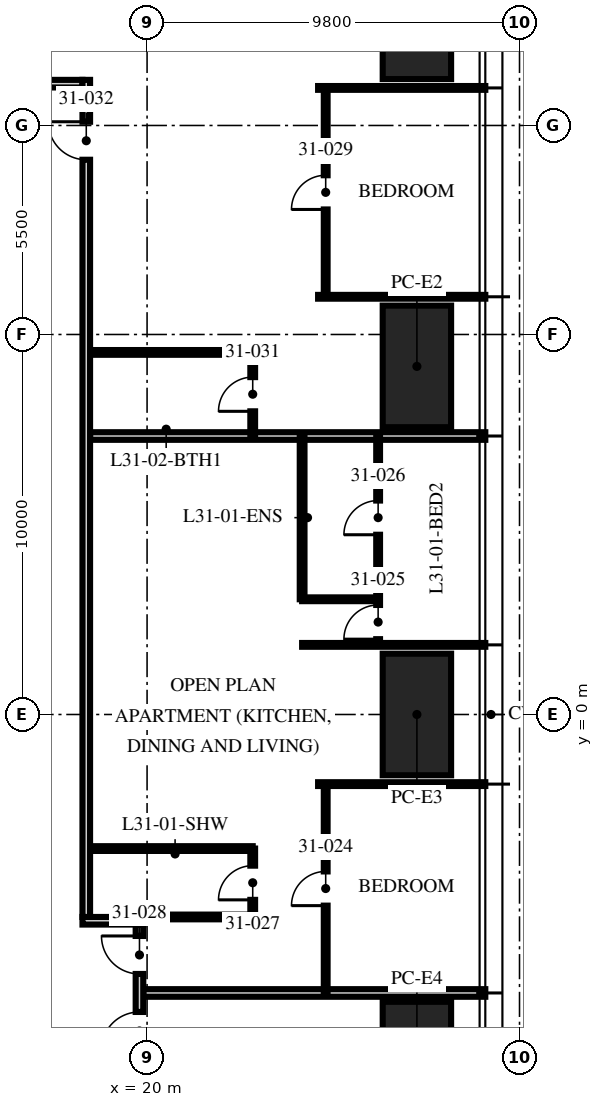
"""IFC4 building model, lengths in metres.
Left out: names, types, materials, properties, quantities, classifications, styles, units other than length and angle.
Written with IfcOpenShell. Run it as: python <this file> out.ifc"""

import sys

from ifc_helpers import new_model, si_unit, direction, frame, frame_2d, origin, origin_2d, place, context, subcontext, project, spatial, rectangle, extrude, element, fill, save


model = new_model("IFC4")
c1 = context("Model", 3, precision=1e-05, world=origin(), true_north=direction((0.0, 1.0)))
c2 = subcontext(c1, "Body", "Model", "MODEL_VIEW")
j1 = project(units=[si_unit("LENGTHUNIT", "METRE"), si_unit("PLANEANGLEUNIT", "RADIAN")], contexts=[c1])
p1 = place(None, origin())
s1 = spatial("IfcSite", under=j1, at=p1, CompositionType="ELEMENT")
p2 = place(p1, origin())
s2 = spatial("IfcBuilding", under=s1, at=p2, CompositionType="ELEMENT")
p3 = place(p2, frame((0.0, 0.0, 126.0)))
s3 = spatial("IfcBuildingStorey", under=s2, at=p3, CompositionType="ELEMENT", Elevation=126.0)
for number, where, z_axis, x_axis in (
    (1, (27.1, 18.32, 0.0), (0.0, 0.0, 1.0), (0.0, 1.0, 0.0)),
    (2, (27.1, 9.16, 0.0), (0.0, 0.0, 1.0), (0.0, 1.0, 0.0)),
    (3, (27.1, 0.0, 0.0), (0.0, 0.0, 1.0), (0.0, 1.0, 0.0)),
    (4, (27.1, -9.16, 0.0), (0.0, 0.0, 1.0), (0.0, 1.0, 0.0)),
):
    element("IfcColumn", number, at=place(p3, frame(where, z_axis=z_axis, x_axis=x_axis)), inside=s3, PredefinedType="COLUMN", context=c2, shape_type="SweptSolid", body=[
        extrude(rectangle(XDim=3.2, YDim=1.8, at=origin_2d()), origin(), (0.0, 0.0, 1.0), 3.75),
    ])
p4 = place(p3, frame((16.5, 16.6, 0.0), z_axis=(0.0, 0.0, 1.0), x_axis=(1.0, 0.0, 0.0)))
e5 = element("IfcWall", 5, at=p4, inside=s3, PredefinedType="PARTITIONING", context=c2, shape_type="SweptSolid", body=[
    extrude(rectangle(XDim=1.8, YDim=0.2, at=frame_2d((0.9, 0.0))), origin(), (0.0, 0.0, 1.0), 2.3),
])
p5 = place(p3, frame((19.9, -7.328, 0.0), z_axis=(0.0, 0.0, 1.0), x_axis=(1.0, 0.0, 0.0)))
e6 = element("IfcWall", 6, at=p5, inside=s3, PredefinedType="PARTITIONING", context=c2, shape_type="SweptSolid", body=[
    extrude(rectangle(XDim=9.0, YDim=0.2, at=frame_2d((4.5, 0.0))), origin(), (0.0, 0.0, 1.0), 2.81),
])
p6 = place(p3, frame((24.5, -1.832, 0.0), z_axis=(0.0, 0.0, 1.0), x_axis=(1.0, 0.0, 0.0)))
e7 = element("IfcWall", 7, at=p6, inside=s3, PredefinedType="PARTITIONING", context=c2, shape_type="SweptSolid", body=[
    extrude(rectangle(XDim=4.4, YDim=0.1, at=frame_2d((2.2, 0.0))), origin(), (0.0, 0.0, 1.0), 2.81),
])
p7 = place(p3, frame((24.08, 1.832, 0.0), z_axis=(0.0, 0.0, 1.0), x_axis=(1.0, 0.0, 0.0)))
e8 = element("IfcWall", 8, at=p7, inside=s3, PredefinedType="PARTITIONING", context=c2, shape_type="SweptSolid", body=[
    extrude(rectangle(XDim=4.82, YDim=0.1, at=frame_2d((2.41, 0.0))), origin(), (0.0, 0.0, 1.0), 2.81),
])
p8 = place(p3, frame((18.5, 7.328, 0.0), z_axis=(0.0, 0.0, 1.0), x_axis=(1.0, 0.0, 0.0)))
e9 = element("IfcWall", 9, at=p8, inside=s3, PredefinedType="PARTITIONING", context=c2, shape_type="SweptSolid", body=[
    extrude(rectangle(XDim=10.4, YDim=0.2, at=frame_2d((5.2, 0.0))), origin(), (0.0, 0.0, 1.0), 2.81),
])
for number, where, z_axis, x_axis in (
    (10, (24.5, 10.992, 0.0), (0.0, 0.0, 1.0), (1.0, 0.0, 0.0)),
    (11, (24.5, 16.488, 0.0), (0.0, 0.0, 1.0), (1.0, 0.0, 0.0)),
):
    element("IfcWall", number, at=place(p3, frame(where, z_axis=z_axis, x_axis=x_axis)), inside=s3, PredefinedType="PARTITIONING", context=c2, shape_type="SweptSolid", body=[
        extrude(rectangle(XDim=4.4, YDim=0.1, at=frame_2d((2.2, 0.0))), origin(), (0.0, 0.0, 1.0), 2.81),
    ])
p9 = place(p3, frame((24.7, -7.328, 0.0), z_axis=(0.0, 0.0, 1.0), x_axis=(0.0, 1.0, 0.0)))
e12 = element("IfcWall", 12, at=p9, inside=s3, PredefinedType="PARTITIONING", context=c2, shape_type="SweptSolid", body=[
    extrude(rectangle(XDim=5.496, YDim=0.1, at=frame_2d((2.748, 0.0))), origin(), (0.0, 0.0, 1.0), 2.81),
])
p10 = place(p9, frame((2.298, 0.0, 0.0)))
e13 = element("IfcOpeningElement", 13, at=p10, cuts=e12, PredefinedType="OPENING", context=c2, shape_type="SweptSolid", body=[
    extrude(rectangle(XDim=0.9, YDim=2.1, at=frame_2d((0.45, 1.05))), frame((0.0, 0.06, 0.0), z_axis=(0.0, -1.0, 0.0), x_axis=(1.0, 0.0, 0.0)), (0.0, 0.0, 1.0), 0.12),
])
p11 = place(p3, frame((26.08, 1.832, 0.0), z_axis=(0.0, 0.0, 1.0), x_axis=(0.0, 1.0, 0.0)))
e14 = element("IfcWall", 14, at=p11, inside=s3, PredefinedType="PARTITIONING", context=c2, shape_type="SweptSolid", body=[
    extrude(rectangle(XDim=5.496, YDim=0.1, at=frame_2d((2.748, 0.0))), origin(), (0.0, 0.0, 1.0), 2.81),
])
p12 = place(p11, frame((0.15, 0.0, 0.0)))
e15 = element("IfcOpeningElement", 15, at=p12, cuts=e14, PredefinedType="OPENING", context=c2, shape_type="SweptSolid", body=[
    extrude(rectangle(XDim=0.9, YDim=2.1, at=frame_2d((0.45, 1.05))), frame((0.0, 0.06, 0.0), z_axis=(0.0, -1.0, 0.0), x_axis=(1.0, 0.0, 0.0)), (0.0, 0.0, 1.0), 0.12),
])
p13 = place(p11, frame((2.898, 0.0, 0.0)))
e16 = element("IfcOpeningElement", 16, at=p13, cuts=e14, PredefinedType="OPENING", context=c2, shape_type="SweptSolid", body=[
    extrude(rectangle(XDim=0.9, YDim=2.1, at=frame_2d((0.45, 1.05))), frame((0.0, 0.06, 0.0), z_axis=(0.0, -1.0, 0.0), x_axis=(1.0, 0.0, 0.0)), (0.0, 0.0, 1.0), 0.12),
])
p14 = place(p3, frame((24.08, 3.032, 0.0), z_axis=(0.0, 0.0, 1.0), x_axis=(1.0, 0.0, 0.0)))
e17 = element("IfcWall", 17, at=p14, inside=s3, PredefinedType="PARTITIONING", context=c2, shape_type="SweptSolid", body=[
    extrude(rectangle(XDim=2.0, YDim=0.1, at=frame_2d((1.0, 0.0))), origin(), (0.0, 0.0, 1.0), 3.5),
])
p15 = place(p3, frame((24.08, 3.032, 0.0), z_axis=(0.0, 0.0, 1.0), x_axis=(0.0, 1.0, 0.0)))
e18 = element("IfcWall", 18, at=p15, inside=s3, PredefinedType="PARTITIONING", context=c2, shape_type="SweptSolid", body=[
    extrude(rectangle(XDim=4.296, YDim=0.125, at=frame_2d((2.148, 0.0))), origin(), (0.0, 0.0, 1.0), 2.81),
])
p16 = place(p3, frame((22.78, -5.328, 0.0), z_axis=(0.0, 0.0, 1.0), x_axis=(0.0, 1.0, 0.0)))
e19 = element("IfcWall", 19, at=p16, inside=s3, PredefinedType="PARTITIONING", context=c2, shape_type="SweptSolid", body=[
    extrude(rectangle(XDim=1.8, YDim=0.125, at=frame_2d((0.9, 0.0))), origin(), (0.0, 0.0, 1.0), 2.81),
])
p17 = place(p16, frame((0.45, 0.0, 0.0)))
e20 = element("IfcOpeningElement", 20, at=p17, cuts=e19, PredefinedType="OPENING", context=c2, shape_type="SweptSolid", body=[
    extrude(rectangle(XDim=0.9, YDim=2.1, at=frame_2d((0.45, 1.05))), frame((0.0, 0.073, 0.0), z_axis=(0.0, -1.0, 0.0), x_axis=(1.0, 0.0, 0.0)), (0.0, 0.0, 1.0), 0.145),
])
p18 = place(p3, frame((19.97, -5.328, 0.0), z_axis=(0.0, 0.0, 1.0), x_axis=(1.0, 0.0, 0.0)))
e21 = element("IfcWall", 21, at=p18, inside=s3, PredefinedType="PARTITIONING", context=c2, shape_type="SweptSolid", body=[
    extrude(rectangle(XDim=2.81, YDim=0.125, at=frame_2d((1.405, 0.0))), origin(), (0.0, 0.0, 1.0), 3.5),
])
p19 = place(p3, frame((18.5, -3.528, 0.0), z_axis=(0.0, 0.0, 1.0), x_axis=(1.0, 0.0, 0.0)))
e22 = element("IfcWall", 22, at=p19, inside=s3, PredefinedType="PARTITIONING", context=c2, shape_type="SweptSolid", body=[
    extrude(rectangle(XDim=4.28, YDim=0.125, at=frame_2d((2.14, 0.0))), origin(), (0.0, 0.0, 1.0), 3.5),
])
p20 = place(p3, frame((24.7, 10.992, 0.0), z_axis=(0.0, 0.0, 1.0), x_axis=(0.0, 1.0, 0.0)))
e23 = element("IfcWall", 23, at=p20, inside=s3, PredefinedType="PARTITIONING", context=c2, shape_type="SweptSolid", body=[
    extrude(rectangle(XDim=5.496, YDim=0.1, at=frame_2d((2.748, 0.0))), origin(), (0.0, 0.0, 1.0), 2.81),
])
p21 = place(p20, frame((2.298, 0.0, 0.0)))
e24 = element("IfcOpeningElement", 24, at=p21, cuts=e23, PredefinedType="OPENING", context=c2, shape_type="SweptSolid", body=[
    extrude(rectangle(XDim=0.9, YDim=2.1, at=frame_2d((0.45, 1.05))), frame((0.0, 0.06, 0.0), z_axis=(0.0, -1.0, 0.0), x_axis=(1.0, 0.0, 0.0)), (0.0, 0.0, 1.0), 0.12),
])
p22 = place(p3, frame((22.78, 7.328, 0.0), z_axis=(0.0, 0.0, 1.0), x_axis=(0.0, 1.0, 0.0)))
e25 = element("IfcWall", 25, at=p22, inside=s3, PredefinedType="PARTITIONING", context=c2, shape_type="SweptSolid", body=[
    extrude(rectangle(XDim=2.2, YDim=0.125, at=frame_2d((1.1, 0.0))), origin(), (0.0, 0.0, 1.0), 2.7),
])
p23 = place(p22, frame((0.65, 0.0, 0.0)))
e26 = element("IfcOpeningElement", 26, at=p23, cuts=e25, PredefinedType="OPENING", context=c2, shape_type="SweptSolid", body=[
    extrude(rectangle(XDim=0.9, YDim=2.1, at=frame_2d((0.45, 1.05))), frame((0.0, 0.073, 0.0), z_axis=(0.0, -1.0, 0.0), x_axis=(1.0, 0.0, 0.0)), (0.0, 0.0, 1.0), 0.145),
])
p24 = place(p3, frame((18.5, 9.528, 0.0), z_axis=(0.0, 0.0, 1.0), x_axis=(1.0, 0.0, 0.0)))
e27 = element("IfcWall", 27, at=p24, inside=s3, PredefinedType="PARTITIONING", context=c2, shape_type="SweptSolid", body=[
    extrude(rectangle(XDim=4.28, YDim=0.125, at=frame_2d((2.14, 0.0))), origin(), (0.0, 0.0, 1.0), 3.5),
])
p25 = place(p3, frame((18.3, -5.428, 0.0), z_axis=(0.0, 0.0, 1.0), x_axis=(1.0, 0.0, 0.0)))
e28 = element("IfcWall", 28, at=p25, inside=s3, PredefinedType="PARTITIONING", context=c2, shape_type="SweptSolid", body=[
    extrude(rectangle(XDim=1.6, YDim=0.2, at=frame_2d((0.8, 0.0))), origin(), (0.0, 0.0, 1.0), 3.5),
])
p26 = place(p3, frame((19.8, -9.128, 0.0), z_axis=(0.0, 0.0, 1.0), x_axis=(0.0, 1.0, 0.0)))
e29 = element("IfcWall", 29, at=p26, inside=s3, PredefinedType="PARTITIONING", context=c2, shape_type="SweptSolid", body=[
    extrude(rectangle(XDim=3.6, YDim=0.2, at=frame_2d((1.8, 0.0))), origin(), (0.0, 0.0, 1.0), 2.7),
])
p27 = place(p26, frame((2.3, 0.0, 0.0)))
e30 = element("IfcOpeningElement", 30, at=p27, cuts=e29, PredefinedType="OPENING", context=c2, shape_type="SweptSolid", body=[
    extrude(rectangle(XDim=1.0, YDim=2.2, at=frame_2d((0.5, 1.1))), frame((0.0, 0.11, 0.0), z_axis=(0.0, -1.0, 0.0), x_axis=(1.0, 0.0, 0.0)), (0.0, 0.0, 1.0), 0.22),
])
p28 = place(p26, frame((0.3, 0.0, 0.0)))
e31 = element("IfcOpeningElement", 31, at=p28, cuts=e29, PredefinedType="OPENING", context=c2, shape_type="SweptSolid", body=[
    extrude(rectangle(XDim=1.0, YDim=2.2, at=frame_2d((0.5, 1.1))), frame((0.0, 0.11, 0.0), z_axis=(0.0, -1.0, 0.0), x_axis=(1.0, 0.0, 0.0)), (0.0, 0.0, 1.0), 0.22),
])
p29 = place(p3, frame((18.4, -5.328, 0.0), z_axis=(0.0, 0.0, 1.0), x_axis=(0.0, 1.0, 0.0)))
e32 = element("IfcWall", 32, at=p29, inside=s3, PredefinedType="PARTITIONING", context=c2, shape_type="SweptSolid", body=[
    extrude(rectangle(XDim=22.028, YDim=0.2, at=frame_2d((11.014, 0.0))), origin(), (0.0, 0.0, 1.0), 2.7),
])
p30 = place(p29, frame((19.926, 0.0, 0.0)))
e33 = element("IfcOpeningElement", 33, at=p30, cuts=e32, PredefinedType="OPENING", context=c2, shape_type="SweptSolid", body=[
    extrude(rectangle(XDim=1.0, YDim=2.2, at=frame_2d((0.5, 1.1))), frame((0.0, 0.11, 0.0), z_axis=(0.0, -1.0, 0.0), x_axis=(1.0, 0.0, 0.0)), (0.0, 0.0, 1.0), 0.22),
])
p31 = place(p10, origin())
e34 = element("IfcDoor", 34, at=p31, inside=s3, OperationType="SINGLE_SWING_LEFT", PredefinedType="DOOR", context=c2, shape_type="SweptSolid", body=[
    extrude(rectangle(XDim=0.9, YDim=2.1, at=frame_2d((0.45, 1.05))), frame((0.0, 0.025, 0.0), z_axis=(0.0, -1.0, 0.0), x_axis=(1.0, 0.0, 0.0)), (0.0, 0.0, 1.0), 0.05),
])
fill(e13, e34)
p32 = place(p12, origin())
e35 = element("IfcDoor", 35, at=p32, inside=s3, OperationType="SINGLE_SWING_LEFT", PredefinedType="DOOR", context=c2, shape_type="SweptSolid", body=[
    extrude(rectangle(XDim=0.9, YDim=2.1, at=frame_2d((0.45, 1.05))), frame((0.0, 0.025, 0.0), z_axis=(0.0, -1.0, 0.0), x_axis=(1.0, 0.0, 0.0)), (0.0, 0.0, 1.0), 0.05),
])
fill(e15, e35)
p33 = place(p13, origin())
e36 = element("IfcDoor", 36, at=p33, inside=s3, OperationType="SINGLE_SWING_LEFT", PredefinedType="DOOR", context=c2, shape_type="SweptSolid", body=[
    extrude(rectangle(XDim=0.9, YDim=2.1, at=frame_2d((0.45, 1.05))), frame((0.0, 0.025, 0.0), z_axis=(0.0, -1.0, 0.0), x_axis=(1.0, 0.0, 0.0)), (0.0, 0.0, 1.0), 0.05),
])
fill(e16, e36)
p34 = place(p17, origin())
e37 = element("IfcDoor", 37, at=p34, inside=s3, OperationType="SINGLE_SWING_LEFT", PredefinedType="DOOR", context=c2, shape_type="SweptSolid", body=[
    extrude(rectangle(XDim=0.9, YDim=2.1, at=frame_2d((0.45, 1.05))), frame((0.0, 0.025, 0.0), z_axis=(0.0, -1.0, 0.0), x_axis=(1.0, 0.0, 0.0)), (0.0, 0.0, 1.0), 0.05),
])
fill(e20, e37)
p35 = place(p27, origin())
e38 = element("IfcDoor", 38, at=p35, inside=s3, OperationType="SINGLE_SWING_RIGHT", PredefinedType="DOOR", context=c2, shape_type="SweptSolid", body=[
    extrude(rectangle(XDim=1.0, YDim=2.2, at=frame_2d((0.5, 1.1))), frame((0.0, 0.025, 0.0), z_axis=(0.0, -1.0, 0.0), x_axis=(1.0, 0.0, 0.0)), (0.0, 0.0, 1.0), 0.05),
])
fill(e30, e38)
p36 = place(p21, origin())
e39 = element("IfcDoor", 39, at=p36, inside=s3, OperationType="SINGLE_SWING_LEFT", PredefinedType="DOOR", context=c2, shape_type="SweptSolid", body=[
    extrude(rectangle(XDim=0.9, YDim=2.1, at=frame_2d((0.45, 1.05))), frame((0.0, 0.025, 0.0), z_axis=(0.0, -1.0, 0.0), x_axis=(1.0, 0.0, 0.0)), (0.0, 0.0, 1.0), 0.05),
])
fill(e24, e39)
p37 = place(p23, origin())
e40 = element("IfcDoor", 40, at=p37, inside=s3, OperationType="SINGLE_SWING_LEFT", PredefinedType="DOOR", context=c2, shape_type="SweptSolid", body=[
    extrude(rectangle(XDim=0.9, YDim=2.1, at=frame_2d((0.45, 1.05))), frame((0.0, 0.025, 0.0), z_axis=(0.0, -1.0, 0.0), x_axis=(1.0, 0.0, 0.0)), (0.0, 0.0, 1.0), 0.05),
])
fill(e26, e40)
p38 = place(p30, origin())
e41 = element("IfcDoor", 41, at=p38, inside=s3, OperationType="SINGLE_SWING_RIGHT", PredefinedType="DOOR", context=c2, shape_type="SweptSolid", body=[
    extrude(rectangle(XDim=1.0, YDim=2.2, at=frame_2d((0.5, 1.1))), frame((0.0, 0.025, 0.0), z_axis=(0.0, -1.0, 0.0), x_axis=(1.0, 0.0, 0.0)), (0.0, 0.0, 1.0), 0.05),
])
fill(e33, e41)
p39 = place(p28, origin())
e42 = element("IfcDoor", 42, at=p39, inside=s3, OperationType="SINGLE_SWING_LEFT", PredefinedType="DOOR", context=c2, shape_type="SweptSolid", body=[
    extrude(rectangle(XDim=1.0, YDim=2.2, at=frame_2d((0.5, 1.1))), frame((0.0, 0.025, 0.0), z_axis=(0.0, -1.0, 0.0), x_axis=(1.0, 0.0, 0.0)), (0.0, 0.0, 1.0), 0.05),
])
fill(e31, e42)
save(model, sys.argv[1])
